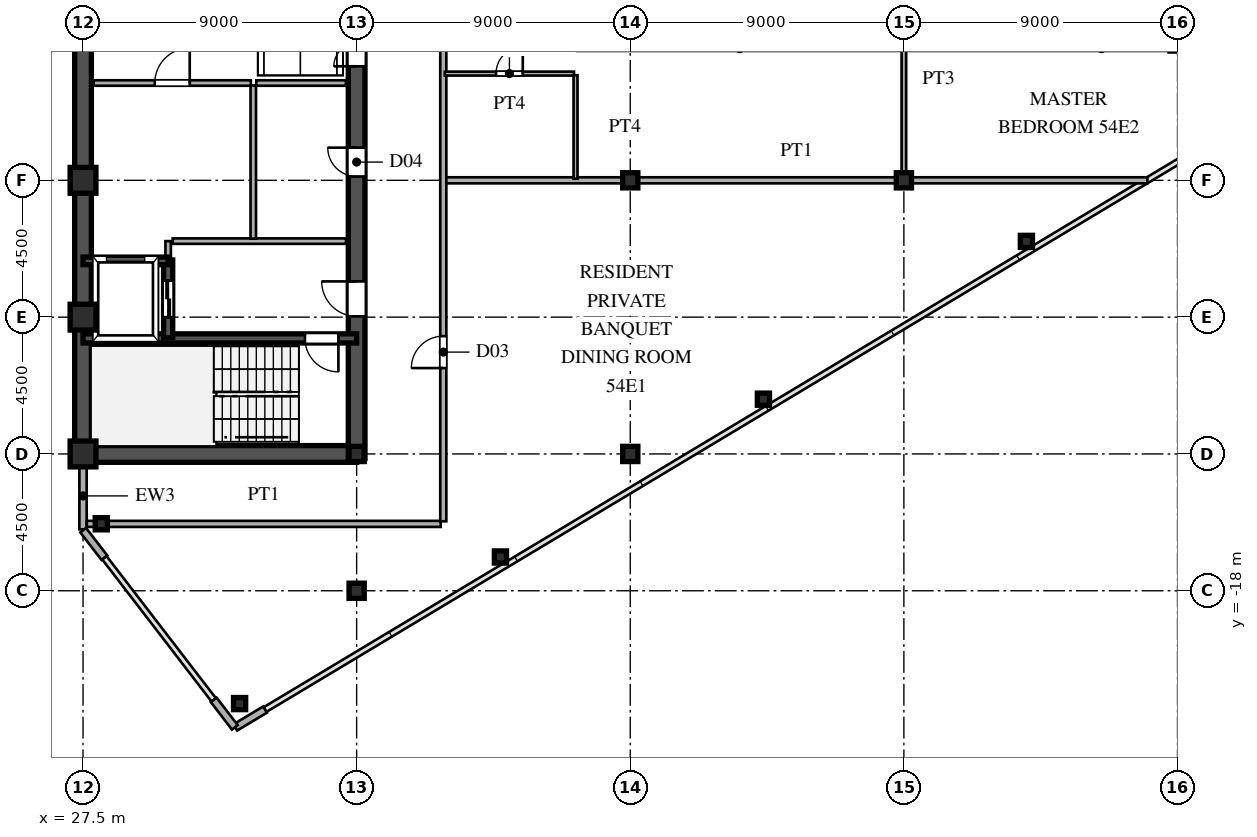
"""IFC4 building model, lengths in metres.
Left out: names, types, materials, properties, quantities, classifications, styles, units other than length and angle.
Written with IfcOpenShell. Run it as: python <this file> out.ifc"""

import sys

from ifc_helpers import new_model, si_unit, direction, frame, frame_2d, origin, origin_2d, place, context, subcontext, project, spatial, rectangle, hollow_rectangle, i_section, extrude, source, transform, mapped, element, fill, save


model = new_model("IFC4")
c1 = context("Model", 3, precision=1e-05, world=origin(), true_north=direction((0.0, 1.0)))
c2 = subcontext(c1, "Body", "Model", "MODEL_VIEW")
j1 = project(units=[si_unit("LENGTHUNIT", "METRE"), si_unit("PLANEANGLEUNIT", "RADIAN")], contexts=[c1])
p1 = place(None, origin())
s1 = spatial("IfcSite", under=j1, at=p1, CompositionType="ELEMENT")
p2 = place(p1, origin())
s2 = spatial("IfcBuilding", under=s1, at=p2, CompositionType="ELEMENT")
p3 = place(p2, frame((0.0, 0.0, 203.1)))
s3 = spatial("IfcBuildingStorey", under=s2, at=p3, CompositionType="ELEMENT", Elevation=203.1)
m1 = source(origin(), c2, "Body", "SweptSolid", [
    extrude(hollow_rectangle(XDim=0.85, YDim=0.85, WallThickness=0.036, at=origin_2d()), origin(), (0.0, 0.0, 1.0), 3.6),
])
for number, where, z_axis, x_axis in (
    (1, (27.5, -13.5, 0.0), (0.0, 0.0, 1.0), (1.0, 0.0, 0.0)),
    (2, (27.5, -9.0, 0.0), (0.0, 0.0, 1.0), (1.0, 0.0, 0.0)),
    (3, (27.5, -4.5, 0.0), (0.0, 0.0, 1.0), (1.0, 0.0, 0.0)),
):
    element("IfcColumn", number, at=place(p3, frame(where, z_axis=z_axis, x_axis=x_axis)), inside=s3, PredefinedType="COLUMN", context=c2, shape_type="MappedRepresentation", body=[
        mapped(m1, transform((0.0, 0.0, 0.0), scale=1.0)),
    ])
m2 = source(origin(), c2, "Body", "SweptSolid", [
    extrude(i_section(OverallWidth=0.5, OverallDepth=0.5, WebThickness=0.02, FlangeThickness=0.032, at=origin_2d()), origin(), (0.0, 0.0, 1.0), 3.6),
])
for number, where, z_axis, x_axis in (
    (4, (36.5, -18.0, 0.0), (0.0, 0.0, 1.0), (1.0, 0.0, 0.0)),
    (5, (36.5, -13.5, 0.0), (0.0, 0.0, 1.0), (1.0, 0.0, 0.0)),
    (6, (45.5, -13.5, 0.0), (0.0, 0.0, 1.0), (1.0, 0.0, 0.0)),
    (7, (45.5, -4.5, 0.0), (0.0, 0.0, 1.0), (1.0, 0.0, 0.0)),
    (8, (54.5, -4.5, 0.0), (0.0, 0.0, 1.0), (1.0, 0.0, 0.0)),
):
    element("IfcColumn", number, at=place(p3, frame(where, z_axis=z_axis, x_axis=x_axis)), inside=s3, PredefinedType="COLUMN", context=c2, shape_type="MappedRepresentation", body=[
        mapped(m2, transform((0.0, 0.0, 0.0), scale=1.0)),
    ])
m3 = source(origin(), c2, "Body", "SweptSolid", [
    extrude(hollow_rectangle(XDim=0.4, YDim=0.4, WallThickness=0.016, at=origin_2d()), origin(), (0.0, 0.0, 1.0), 3.6),
])
for number, where, z_axis, x_axis in (
    (9, (32.65, -21.71, 0.0), (0.0, 0.0, 1.0), (1.0, 0.0, 0.0)),
    (10, (28.1, -15.796, 0.0), (0.0, 0.0, 1.0), (1.0, 0.0, 0.0)),
    (11, (41.23, -16.889, 0.0), (0.0, 0.0, 1.0), (1.0, 0.0, 0.0)),
    (12, (49.88, -11.699, 0.0), (0.0, 0.0, 1.0), (1.0, 0.0, 0.0)),
    (13, (58.53, -6.509, 0.0), (0.0, 0.0, 1.0), (1.0, 0.0, 0.0)),
):
    element("IfcColumn", number, at=place(p3, frame(where, z_axis=z_axis, x_axis=x_axis)), inside=s3, PredefinedType="COLUMN", context=c2, shape_type="MappedRepresentation", body=[
        mapped(m3, transform((0.0, 0.0, 0.0), scale=1.0)),
    ])
p4 = place(p3, frame((32.509, -22.495, 0.0), z_axis=(0.0, 0.0, 1.0), x_axis=(0.85743623509, 0.514590228002, 0.0)))
e14 = element("IfcWall", 14, at=p4, inside=s3, PredefinedType="SOLIDWALL", context=c2, shape_type="SweptSolid", body=[
    extrude(rectangle(XDim=1.14, YDim=0.24, at=frame_2d((0.57, 0.0))), origin(), (0.0, 0.0, 1.0), 3.38),
])
p5 = place(p3, frame((27.5, -15.98, 0.0), z_axis=(0.0, 0.0, 1.0), x_axis=(0.0, 1.0, 0.0)))
e15 = element("IfcWall", 15, at=p5, inside=s3, PredefinedType="SOLIDWALL", context=c2, shape_type="SweptSolid", body=[
    extrude(rectangle(XDim=1.6, YDim=0.24, at=frame_2d((0.8, 0.0))), origin(), (0.0, 0.0, 1.0), 3.38),
])
p6 = place(p3, frame((27.5, -14.38, 0.0), z_axis=(0.0, 0.0, 1.0), x_axis=(0.0, 1.0, 0.0)))
e16 = element("IfcWall", 16, at=p6, inside=s3, PredefinedType="SOLIDWALL", context=c2, shape_type="SweptSolid", body=[
    extrude(rectangle(XDim=0.6, YDim=0.24, at=frame_2d((0.3, 0.0))), origin(), (0.0, 0.0, 1.0), 2.88),
])
for number, where, z_axis, x_axis in (
    (17, (27.506, -16.008, 0.0), (0.0, 0.0, 1.0), (0.61, -0.793, 0.0)),
    (18, (31.799, -21.588, 0.0), (0.0, 0.0, 1.0), (0.61, -0.793, 0.0)),
):
    element("IfcWall", number, at=place(p3, frame(where, z_axis=z_axis, x_axis=x_axis)), inside=s3, PredefinedType="SOLIDWALL", context=c2, shape_type="SweptSolid", body=[
        extrude(rectangle(XDim=1.14, YDim=0.24, at=frame_2d((0.57, 0.0))), origin(), (0.0, 0.0, 1.0), 3.38),
    ])
p7 = place(p3, frame((27.5, -13.5, 0.0), z_axis=(0.0, 0.0, 1.0), x_axis=(0.0, 1.0, 0.0)))
e19 = element("IfcWall", 19, at=p7, inside=s3, PredefinedType="SHEAR", context=c2, shape_type="SweptSolid", body=[
    extrude(rectangle(XDim=12.2, YDim=0.55, at=frame_2d((6.1, 0.0))), origin(), (0.0, 0.0, 1.0), 3.38),
])
p8 = place(p3, frame((27.5, -1.3, 0.0), z_axis=(0.0, 0.0, 1.0), x_axis=(0.0, 1.0, 0.0)))
e20 = element("IfcWall", 20, at=p8, inside=s3, PredefinedType="SHEAR", context=c2, shape_type="SweptSolid", body=[
    extrude(rectangle(XDim=2.6, YDim=0.55, at=frame_2d((1.3, 0.0))), origin(), (0.0, 0.0, 1.0), 3.38),
])
p9 = place(p3, frame((27.5, -13.5, 0.0), z_axis=(0.0, 0.0, 1.0), x_axis=(1.0, 0.0, 0.0)))
e21 = element("IfcWall", 21, at=p9, inside=s3, PredefinedType="SHEAR", context=c2, shape_type="SweptSolid", body=[
    extrude(rectangle(XDim=9.0, YDim=0.55, at=frame_2d((4.5, 0.0))), origin(), (0.0, 0.0, 1.0), 3.38),
])
p10 = place(p3, frame((36.5, -13.65, 0.0), z_axis=(0.0, 0.0, 1.0), x_axis=(0.0, 1.0, 0.0)))
e22 = element("IfcWall", 22, at=p10, inside=s3, PredefinedType="SHEAR", context=c2, shape_type="SweptSolid", body=[
    extrude(rectangle(XDim=7.15, YDim=0.55, at=frame_2d((3.575, 0.0))), origin(), (0.0, 0.0, 1.0), 3.38),
])
p11 = place(p10, frame((4.675, 0.0, 0.0)))
e23 = element("IfcOpeningElement", 23, at=p11, cuts=e22, PredefinedType="OPENING", context=c2, shape_type="SweptSolid", body=[
    extrude(rectangle(XDim=1.15, YDim=2.2, at=frame_2d((0.575, 1.1))), frame((0.0, 0.285, 0.0), z_axis=(0.0, -1.0, 0.0), x_axis=(1.0, 0.0, 0.0)), (0.0, 0.0, 1.0), 0.57),
])
p12 = place(p3, frame((36.5, -1.3, 0.0), z_axis=(0.0, 0.0, 1.0), x_axis=(0.0, 1.0, 0.0)))
e24 = element("IfcWall", 24, at=p12, inside=s3, PredefinedType="SHEAR", context=c2, shape_type="SweptSolid", body=[
    extrude(rectangle(XDim=2.6, YDim=0.55, at=frame_2d((1.3, 0.0))), origin(), (0.0, 0.0, 1.0), 3.38),
])
p13 = place(p12, frame((0.55, 0.0, 0.0)))
e25 = element("IfcOpeningElement", 25, at=p13, cuts=e24, PredefinedType="OPENING", context=c2, shape_type="SweptSolid", body=[
    extrude(rectangle(XDim=1.5, YDim=2.3, at=frame_2d((0.75, 1.15))), frame((0.0, 0.285, 0.0), z_axis=(0.0, -1.0, 0.0), x_axis=(1.0, 0.0, 0.0)), (0.0, 0.0, 1.0), 0.57),
])
p14 = place(p3, frame((36.5, -6.5, 0.0), z_axis=(0.0, 0.0, 1.0), x_axis=(0.0, 1.0, 0.0)))
e26 = element("IfcWall", 26, at=p14, inside=s3, PredefinedType="SHEAR", context=c2, shape_type="SweptSolid", body=[
    extrude(rectangle(XDim=5.2, YDim=0.55, at=frame_2d((2.6, 0.0))), origin(), (0.0, 0.0, 1.0), 3.38),
])
p15 = place(p14, frame((2.125, 0.0, 0.0)))
e27 = element("IfcOpeningElement", 27, at=p15, cuts=e26, PredefinedType="OPENING", context=c2, shape_type="SweptSolid", body=[
    extrude(rectangle(XDim=0.95, YDim=2.15, at=frame_2d((0.475, 1.075))), frame((0.0, 0.285, 0.0), z_axis=(0.0, -1.0, 0.0), x_axis=(1.0, 0.0, 0.0)), (0.0, 0.0, 1.0), 0.57),
])
p16 = place(p3, frame((27.5, -9.7, 0.0), z_axis=(0.0, 0.0, 1.0), x_axis=(1.0, 0.0, 0.0)))
e28 = element("IfcWall", 28, at=p16, inside=s3, PredefinedType="SHEAR", context=c2, shape_type="SweptSolid", body=[
    extrude(rectangle(XDim=9.0, YDim=0.3, at=frame_2d((4.5, 0.0))), origin(), (0.0, 0.0, 1.0), 3.38),
])
p17 = place(p16, frame((7.3, 0.0, 0.0)))
e29 = element("IfcOpeningElement", 29, at=p17, cuts=e28, PredefinedType="OPENING", context=c2, shape_type="SweptSolid", body=[
    extrude(rectangle(XDim=1.1, YDim=2.2, at=frame_2d((0.55, 1.1))), frame((0.0, 0.16, 0.0), z_axis=(0.0, -1.0, 0.0), x_axis=(1.0, 0.0, 0.0)), (0.0, 0.0, 1.0), 0.32),
])
p18 = place(p3, frame((27.5, -7.15, 0.0), z_axis=(0.0, 0.0, 1.0), x_axis=(1.0, 0.0, 0.0)))
e30 = element("IfcWall", 30, at=p18, inside=s3, PredefinedType="SHEAR", context=c2, shape_type="SweptSolid", body=[
    extrude(rectangle(XDim=2.8, YDim=0.25, at=frame_2d((1.4, 0.0))), origin(), (0.0, 0.0, 1.0), 3.38),
])
p19 = place(p3, frame((30.3, -9.68, 0.0), z_axis=(0.0, 0.0, 1.0), x_axis=(0.0, 1.0, 0.0)))
e31 = element("IfcWall", 31, at=p19, inside=s3, PredefinedType="SHEAR", context=c2, shape_type="SweptSolid", body=[
    extrude(rectangle(XDim=2.56, YDim=0.3, at=frame_2d((1.28, 0.0))), origin(), (0.0, 0.0, 1.0), 3.38),
])
p20 = place(p19, frame((0.68, 0.0, 0.0)))
e32 = element("IfcOpeningElement", 32, at=p20, cuts=e31, PredefinedType="OPENING", context=c2, shape_type="SweptSolid", body=[
    extrude(rectangle(XDim=1.2, YDim=2.25, at=frame_2d((0.6, 1.125))), frame((0.0, 0.16, 0.0), z_axis=(0.0, -1.0, 0.0), x_axis=(1.0, 0.0, 0.0)), (0.0, 0.0, 1.0), 0.32),
])
p21 = place(p3, frame((30.45, -6.5, 0.0), z_axis=(0.0, 0.0, 1.0), x_axis=(1.0, 0.0, 0.0)))
e33 = element("IfcWall", 33, at=p21, inside=s3, PredefinedType="PARTITIONING", context=c2, shape_type="SweptSolid", body=[
    extrude(rectangle(XDim=5.7, YDim=0.18, at=frame_2d((2.85, 0.0))), origin(), (0.0, 0.0, 1.0), 3.38),
])
p22 = place(p3, frame((30.3, -7.12, 0.0), z_axis=(0.0, 0.0, 1.0), x_axis=(0.0, 1.0, 0.0)))
e34 = element("IfcWall", 34, at=p22, inside=s3, PredefinedType="PARTITIONING", context=c2, shape_type="SweptSolid", body=[
    extrude(rectangle(XDim=0.62, YDim=0.18, at=frame_2d((0.31, 0.0))), origin(), (0.0, 0.0, 1.0), 3.38),
])
p23 = place(p3, frame((33.1, -6.42, 0.0), z_axis=(0.0, 0.0, 1.0), x_axis=(0.0, 1.0, 0.0)))
e35 = element("IfcWall", 35, at=p23, inside=s3, PredefinedType="PARTITIONING", context=c2, shape_type="SweptSolid", body=[
    extrude(rectangle(XDim=5.04, YDim=0.18, at=frame_2d((2.52, 0.0))), origin(), (0.0, 0.0, 1.0), 3.38),
])
p24 = place(p3, frame((27.85, -1.3, 0.0), z_axis=(0.0, 0.0, 1.0), x_axis=(1.0, 0.0, 0.0)))
e36 = element("IfcWall", 36, at=p24, inside=s3, PredefinedType="PARTITIONING", context=c2, shape_type="SweptSolid", body=[
    extrude(rectangle(XDim=5.17, YDim=0.18, at=frame_2d((2.585, 0.0))), origin(), (0.0, 0.0, 1.0), 3.38),
])
p25 = place(p24, frame((2.01, 0.0, 0.0)))
e37 = element("IfcOpeningElement", 37, at=p25, cuts=e36, PredefinedType="OPENING", context=c2, shape_type="SweptSolid", body=[
    extrude(rectangle(XDim=1.15, YDim=2.2, at=frame_2d((0.575, 1.1))), frame((0.0, 0.1, 0.0), z_axis=(0.0, -1.0, 0.0), x_axis=(1.0, 0.0, 0.0)), (0.0, 0.0, 1.0), 0.2),
])
p26 = place(p3, frame((33.2, -1.3, 0.0), z_axis=(0.0, 0.0, 1.0), x_axis=(1.0, 0.0, 0.0)))
e38 = element("IfcWall", 38, at=p26, inside=s3, PredefinedType="PARTITIONING", context=c2, shape_type="SweptSolid", body=[
    extrude(rectangle(XDim=2.95, YDim=0.18, at=frame_2d((1.475, 0.0))), origin(), (0.0, 0.0, 1.0), 3.38),
])
p27 = place(p3, frame((27.625, -15.8, 0.0), z_axis=(0.0, 0.0, 1.0), x_axis=(1.0, 0.0, 0.0)))
e39 = element("IfcWall", 39, at=p27, inside=s3, PredefinedType="PARTITIONING", context=c2, shape_type="SweptSolid", body=[
    extrude(rectangle(XDim=11.64, YDim=0.2, at=frame_2d((5.82, 0.0))), origin(), (0.0, 0.0, 1.0), 3.38),
])
p28 = place(p3, frame((39.43, -4.5, 0.0), z_axis=(0.0, 0.0, 1.0), x_axis=(1.0, 0.0, 0.0)))
e40 = element("IfcWall", 40, at=p28, inside=s3, PredefinedType="PARTITIONING", context=c2, shape_type="SweptSolid", body=[
    extrude(rectangle(XDim=15.09, YDim=0.2, at=frame_2d((7.545, 0.0))), origin(), (0.0, 0.0, 1.0), 2.78),
])
p29 = place(p3, frame((54.52, -4.5, 0.0), z_axis=(0.0, 0.0, 1.0), x_axis=(1.0, 0.0, 0.0)))
e41 = element("IfcWall", 41, at=p29, inside=s3, PredefinedType="PARTITIONING", context=c2, shape_type="SweptSolid", body=[
    extrude(rectangle(XDim=7.99, YDim=0.2, at=frame_2d((3.995, 0.0))), origin(), (0.0, 0.0, 1.0), 3.38),
])
p30 = place(p3, frame((39.4, -0.99, 0.0), z_axis=(0.0, 0.0, 1.0), x_axis=(1.0, 0.0, 0.0)))
e42 = element("IfcWall", 42, at=p30, inside=s3, PredefinedType="PARTITIONING", context=c2, shape_type="SweptSolid", body=[
    extrude(rectangle(XDim=4.25, YDim=0.13, at=frame_2d((2.125, 0.0))), origin(), (0.0, 0.0, 1.0), 3.38),
])
p31 = place(p30, frame((1.685, 0.0, 0.0)))
e43 = element("IfcOpeningElement", 43, at=p31, cuts=e42, PredefinedType="OPENING", context=c2, shape_type="SweptSolid", body=[
    extrude(rectangle(XDim=0.88, YDim=2.1, at=frame_2d((0.44, 1.05))), frame((0.0, 0.075, 0.0), z_axis=(0.0, -1.0, 0.0), x_axis=(1.0, 0.0, 0.0)), (0.0, 0.0, 1.0), 0.15),
])
p32 = place(p3, frame((39.35, -15.715, 0.0), z_axis=(0.0, 0.0, 1.0), x_axis=(0.0, 1.0, 0.0)))
e44 = element("IfcWall", 44, at=p32, inside=s3, PredefinedType="PARTITIONING", context=c2, shape_type="SweptSolid", body=[
    extrude(rectangle(XDim=31.43, YDim=0.2, at=frame_2d((15.715, 0.0))), origin(), (0.0, 0.0, 1.0), 3.38),
])
p33 = place(p32, frame((5.04, 0.0, 0.0)))
e45 = element("IfcOpeningElement", 45, at=p33, cuts=e44, PredefinedType="OPENING", context=c2, shape_type="SweptSolid", body=[
    extrude(rectangle(XDim=1.05, YDim=2.25, at=frame_2d((0.525, 1.125))), frame((0.0, 0.11, 0.0), z_axis=(0.0, -1.0, 0.0), x_axis=(1.0, 0.0, 0.0)), (0.0, 0.0, 1.0), 0.22),
])
p34 = place(p32, frame((16.995, 0.0, 0.0)))
e46 = element("IfcOpeningElement", 46, at=p34, cuts=e44, PredefinedType="OPENING", context=c2, shape_type="SweptSolid", body=[
    extrude(rectangle(XDim=1.05, YDim=2.25, at=frame_2d((0.525, 1.125))), frame((0.0, 0.11, 0.0), z_axis=(0.0, -1.0, 0.0), x_axis=(1.0, 0.0, 0.0)), (0.0, 0.0, 1.0), 0.22),
])
p35 = place(p32, frame((27.34, 0.0, 0.0)))
e47 = element("IfcOpeningElement", 47, at=p35, cuts=e44, PredefinedType="OPENING", context=c2, shape_type="SweptSolid", body=[
    extrude(rectangle(XDim=1.05, YDim=2.25, at=frame_2d((0.525, 1.125))), frame((0.0, 0.11, 0.0), z_axis=(0.0, -1.0, 0.0), x_axis=(1.0, 0.0, 0.0)), (0.0, 0.0, 1.0), 0.22),
])
p36 = place(p3, frame((43.7, -4.45, 0.0), z_axis=(0.0, 0.0, 1.0), x_axis=(0.0, 1.0, 0.0)))
e48 = element("IfcWall", 48, at=p36, inside=s3, PredefinedType="PARTITIONING", context=c2, shape_type="SweptSolid", body=[
    extrude(rectangle(XDim=3.408, YDim=0.13, at=frame_2d((1.704, 0.0))), origin(), (0.0, 0.0, 1.0), 3.38),
])
p37 = place(p3, frame((54.5, -4.45, 0.0), z_axis=(0.0, 0.0, 1.0), x_axis=(0.0, 1.0, 0.0)))
e49 = element("IfcWall", 49, at=p37, inside=s3, PredefinedType="PARTITIONING", context=c2, shape_type="SweptSolid", body=[
    extrude(rectangle(XDim=12.9, YDim=0.15, at=frame_2d((6.45, 0.0))), origin(), (0.0, 0.0, 1.0), 2.78),
])
p38 = place(p37, frame((5.975, 0.0, 0.0)))
e50 = element("IfcOpeningElement", 50, at=p38, cuts=e49, PredefinedType="OPENING", context=c2, shape_type="SweptSolid", body=[
    extrude(rectangle(XDim=0.95, YDim=2.15, at=frame_2d((0.475, 1.075))), frame((0.0, 0.085, 0.0), z_axis=(0.0, -1.0, 0.0), x_axis=(1.0, 0.0, 0.0)), (0.0, 0.0, 1.0), 0.17),
])
m4 = source(origin(), c2, "Body", "SweptSolid", [
    extrude(rectangle(XDim=1.15, YDim=2.2, at=frame_2d((0.575, 1.1))), frame((0.0, 0.025, 0.0), z_axis=(0.0, -1.0, 0.0), x_axis=(1.0, 0.0, 0.0)), (0.0, 0.0, 1.0), 0.05),
])
p39 = place(p11, origin())
e51 = element("IfcDoor", 51, at=p39, inside=s3, OperationType="SINGLE_SWING_RIGHT", PredefinedType="DOOR", context=c2, shape_type="MappedRepresentation", body=[
    mapped(m4, transform((0.0, 0.0, 0.0), scale=1.0)),
])
fill(e23, e51)
m5 = source(origin(), c2, "Body", "SweptSolid", [
    extrude(rectangle(XDim=1.5, YDim=2.3, at=frame_2d((0.75, 1.15))), frame((0.0, 0.025, 0.0), z_axis=(0.0, -1.0, 0.0), x_axis=(1.0, 0.0, 0.0)), (0.0, 0.0, 1.0), 0.05),
])
p40 = place(p13, origin())
e52 = element("IfcDoor", 52, at=p40, inside=s3, OperationType="DOUBLE_SWING_LEFT", PredefinedType="DOOR", context=c2, shape_type="MappedRepresentation", body=[
    mapped(m5, transform((0.0, 0.0, 0.0), scale=1.0)),
])
fill(e25, e52)
m6 = source(origin(), c2, "Body", "SweptSolid", [
    extrude(rectangle(XDim=0.95, YDim=2.15, at=frame_2d((0.475, 1.075))), frame((0.0, 0.025, 0.0), z_axis=(0.0, -1.0, 0.0), x_axis=(1.0, 0.0, 0.0)), (0.0, 0.0, 1.0), 0.05),
])
p41 = place(p15, origin())
e53 = element("IfcDoor", 53, at=p41, inside=s3, OperationType="SINGLE_SWING_RIGHT", PredefinedType="DOOR", context=c2, shape_type="MappedRepresentation", body=[
    mapped(m6, transform((0.0, 0.0, 0.0), scale=1.0)),
])
fill(e27, e53)
m7 = source(origin(), c2, "Body", "SweptSolid", [
    extrude(rectangle(XDim=1.1, YDim=2.2, at=frame_2d((0.55, 1.1))), frame((0.0, 0.025, 0.0), z_axis=(0.0, -1.0, 0.0), x_axis=(1.0, 0.0, 0.0)), (0.0, 0.0, 1.0), 0.05),
])
p42 = place(p17, frame((1.1, 0.0, 0.0), z_axis=(0.0, 0.0, 1.0), x_axis=(-1.0, 0.0, 0.0)))
e54 = element("IfcDoor", 54, at=p42, inside=s3, OperationType="SINGLE_SWING_RIGHT", PredefinedType="DOOR", context=c2, shape_type="MappedRepresentation", body=[
    mapped(m7, transform((0.0, 0.0, 0.0), scale=1.0)),
])
fill(e29, e54)
m8 = source(origin(), c2, "Body", "SweptSolid", [
    extrude(rectangle(XDim=1.2, YDim=2.25, at=frame_2d((0.6, 1.125))), frame((0.0, 0.025, 0.0), z_axis=(0.0, -1.0, 0.0), x_axis=(1.0, 0.0, 0.0)), (0.0, 0.0, 1.0), 0.05),
])
p43 = place(p20, origin())
e55 = element("IfcDoor", 55, at=p43, inside=s3, OperationType="DOUBLE_DOOR_SLIDING", PredefinedType="DOOR", context=c2, shape_type="MappedRepresentation", body=[
    mapped(m8, transform((0.0, 0.0, 0.0), scale=1.0)),
])
fill(e32, e55)
p44 = place(p25, origin())
e56 = element("IfcDoor", 56, at=p44, inside=s3, OperationType="SINGLE_SWING_RIGHT", PredefinedType="DOOR", context=c2, shape_type="MappedRepresentation", body=[
    mapped(m4, transform((0.0, 0.0, 0.0), scale=1.0)),
])
fill(e37, e56)
m9 = source(origin(), c2, "Body", "SweptSolid", [
    extrude(rectangle(XDim=0.88, YDim=2.1, at=frame_2d((0.44, 1.05))), frame((0.0, 0.025, 0.0), z_axis=(0.0, -1.0, 0.0), x_axis=(1.0, 0.0, 0.0)), (0.0, 0.0, 1.0), 0.05),
])
p45 = place(p31, origin())
e57 = element("IfcDoor", 57, at=p45, inside=s3, OperationType="SINGLE_SWING_RIGHT", PredefinedType="DOOR", context=c2, shape_type="MappedRepresentation", body=[
    mapped(m9, transform((0.0, 0.0, 0.0), scale=1.0)),
])
fill(e43, e57)
m10 = source(origin(), c2, "Body", "SweptSolid", [
    extrude(rectangle(XDim=1.05, YDim=2.25, at=frame_2d((0.525, 1.125))), frame((0.0, 0.025, 0.0), z_axis=(0.0, -1.0, 0.0), x_axis=(1.0, 0.0, 0.0)), (0.0, 0.0, 1.0), 0.05),
])
p46 = place(p33, origin())
e58 = element("IfcDoor", 58, at=p46, inside=s3, OperationType="SINGLE_SWING_LEFT", PredefinedType="DOOR", context=c2, shape_type="MappedRepresentation", body=[
    mapped(m10, transform((0.0, 0.0, 0.0), scale=1.0)),
])
fill(e45, e58)
save(model, sys.argv[1])
